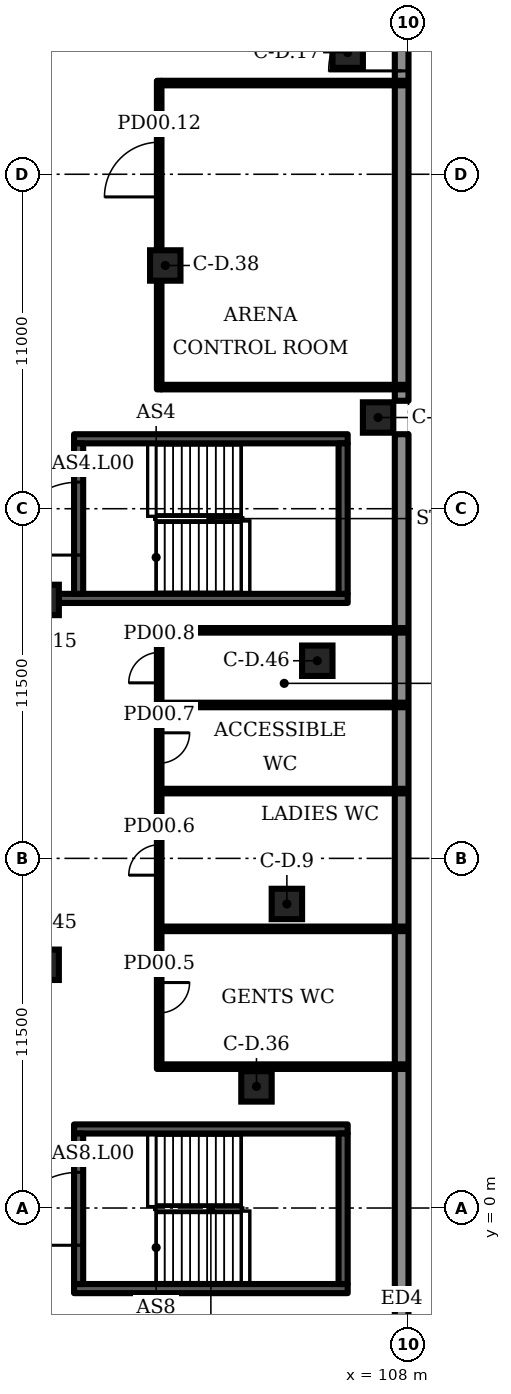
"""IFC4 building model, lengths in metres.
Left out: names, types, materials, properties, quantities, classifications, styles, units other than length and angle.
Written with IfcOpenShell. Run it as: python <this file> out.ifc"""

import sys

from ifc_helpers import new_model, si_unit, direction, frame, frame_2d, origin, origin_2d, place, context, subcontext, project, spatial, rectangle, extrude, element, fill, save


model = new_model("IFC4")
c1 = context("Model", 3, precision=1e-05, world=origin(), true_north=direction((0.0, 1.0)))
c2 = subcontext(c1, "Body", "Model", "MODEL_VIEW")
j1 = project(units=[si_unit("LENGTHUNIT", "METRE"), si_unit("PLANEANGLEUNIT", "RADIAN")], contexts=[c1])
p1 = place(None, origin())
s1 = spatial("IfcSite", under=j1, at=p1, CompositionType="ELEMENT")
p2 = place(p1, origin())
s2 = spatial("IfcBuilding", under=s1, at=p2, CompositionType="ELEMENT")
p3 = place(p2, origin())
s3 = spatial("IfcBuildingStorey", under=s2, at=p3, CompositionType="ELEMENT", Elevation=0.0)
for number, where, z_axis, x_axis in (
    (1, (107.0, 26.0, 0.0), (0.0, 0.0, 1.0), (1.0, 0.0, 0.0)),
    (2, (104.0, 10.0, 0.0), (0.0, 0.0, 1.0), (1.0, 0.0, 0.0)),
    (3, (96.0, 20.0, 0.0), (0.0, 0.0, 1.0), (1.0, 0.0, 0.0)),
    (4, (106.0, 38.0, 0.0), (0.0, 0.0, 1.0), (1.0, 0.0, 0.0)),
    (5, (103.0, 4.0, 0.0), (0.0, 0.0, 1.0), (1.0, 0.0, 0.0)),
    (6, (100.0, 31.0, 0.0), (0.0, 0.0, 1.0), (1.0, 0.0, 0.0)),
    (7, (96.0, 8.0, 0.0), (0.0, 0.0, 1.0), (1.0, 0.0, 0.0)),
    (8, (105.0, 18.0, 0.0), (0.0, 0.0, 1.0), (1.0, 0.0, 0.0)),
):
    element("IfcColumn", number, at=place(p3, frame(where, z_axis=z_axis, x_axis=x_axis)), inside=s3, PredefinedType="COLUMN", context=c2, shape_type="SweptSolid", body=[
        extrude(rectangle(XDim=1.0, YDim=1.0, at=origin_2d()), origin(), (0.0, 0.0, 1.0), 8.0),
    ])
p4 = place(p3, frame((107.775, -6.45, 0.0), z_axis=(0.0, 0.0, 1.0), x_axis=(0.0, 1.0, 0.0)))
e9 = element("IfcWall", 9, at=p4, inside=s3, PredefinedType="SOLIDWALL", context=c2, shape_type="SweptSolid", body=[
    extrude(rectangle(XDim=31.9, YDim=0.45, at=frame_2d((15.95, 0.0))), origin(), (0.0, 0.0, 1.0), 7.7),
])
p5 = place(p4, frame((0.45, 0.0, 0.0)))
e10 = element("IfcOpeningElement", 10, at=p5, cuts=e9, PredefinedType="OPENING", context=c2, shape_type="SweptSolid", body=[
    extrude(rectangle(XDim=2.4, YDim=2.4, at=frame_2d((1.2, 1.2))), frame((0.0, 0.235, 0.0), z_axis=(0.0, -1.0, 0.0), x_axis=(1.0, 0.0, 0.0)), (0.0, 0.0, 1.0), 0.47),
])
p6 = place(p3, frame((107.775, 26.55, 0.0), z_axis=(0.0, 0.0, 1.0), x_axis=(0.0, 1.0, 0.0)))
e11 = element("IfcWall", 11, at=p6, inside=s3, PredefinedType="SOLIDWALL", context=c2, shape_type="SweptSolid", body=[
    extrude(rectangle(XDim=23.35, YDim=0.45, at=frame_2d((11.675, 0.0))), origin(), (0.0, 0.0, 1.0), 7.7),
])
p7 = place(p6, frame((10.85, 0.0, 0.0)))
e12 = element("IfcOpeningElement", 12, at=p7, cuts=e11, PredefinedType="OPENING", context=c2, shape_type="SweptSolid", body=[
    extrude(rectangle(XDim=2.4, YDim=2.4, at=frame_2d((1.2, 1.2))), frame((0.0, 0.235, 0.0), z_axis=(0.0, -1.0, 0.0), x_axis=(1.0, 0.0, 0.0)), (0.0, 0.0, 1.0), 0.47),
])
for number, where, z_axis, x_axis in (
    (13, (99.875, 19.0, 0.0), (0.0, 0.0, 1.0), (1.0, 0.0, 0.0)),
    (14, (99.875, 4.65, 0.0), (0.0, 0.0, 1.0), (1.0, 0.0, 0.0)),
    (15, (99.875, 9.182, 0.0), (0.0, 0.0, 1.0), (1.0, 0.0, 0.0)),
):
    element("IfcWall", number, at=place(p3, frame(where, z_axis=z_axis, x_axis=x_axis)), inside=s3, PredefinedType="PARTITIONING", context=c2, shape_type="SweptSolid", body=[
        extrude(rectangle(XDim=8.02, YDim=0.15, at=frame_2d((4.01, 0.0))), origin(), (0.0, 0.0, 1.0), 7.7),
    ])
p8 = place(p3, frame((99.8, 4.575, 0.0), z_axis=(0.0, 0.0, 1.0), x_axis=(0.0, 1.0, 0.0)))
e16 = element("IfcWall", 16, at=p8, inside=s3, PredefinedType="PARTITIONING", context=c2, shape_type="SweptSolid", body=[
    extrude(rectangle(XDim=14.5, YDim=0.15, at=frame_2d((7.25, 0.0))), origin(), (0.0, 0.0, 1.0), 7.7),
])
p9 = place(p8, frame((1.841, 0.0, 0.0)))
e17 = element("IfcOpeningElement", 17, at=p9, cuts=e16, PredefinedType="OPENING", context=c2, shape_type="SweptSolid", body=[
    extrude(rectangle(XDim=1.0, YDim=2.1, at=frame_2d((0.5, 1.05))), frame((0.0, 0.085, 0.0), z_axis=(0.0, -1.0, 0.0), x_axis=(1.0, 0.0, 0.0)), (0.0, 0.0, 1.0), 0.17),
])
p10 = place(p8, frame((6.372, 0.0, 0.0)))
e18 = element("IfcOpeningElement", 18, at=p10, cuts=e16, PredefinedType="OPENING", context=c2, shape_type="SweptSolid", body=[
    extrude(rectangle(XDim=1.0, YDim=2.1, at=frame_2d((0.5, 1.05))), frame((0.0, 0.085, 0.0), z_axis=(0.0, -1.0, 0.0), x_axis=(1.0, 0.0, 0.0)), (0.0, 0.0, 1.0), 0.17),
])
p11 = place(p8, frame((10.054, 0.0, 0.0)))
e19 = element("IfcOpeningElement", 19, at=p11, cuts=e16, PredefinedType="OPENING", context=c2, shape_type="SweptSolid", body=[
    extrude(rectangle(XDim=1.0, YDim=2.1, at=frame_2d((0.5, 1.05))), frame((0.0, 0.085, 0.0), z_axis=(0.0, -1.0, 0.0), x_axis=(1.0, 0.0, 0.0)), (0.0, 0.0, 1.0), 0.17),
])
p12 = place(p8, frame((12.698, 0.0, 0.0)))
e20 = element("IfcOpeningElement", 20, at=p12, cuts=e16, PredefinedType="OPENING", context=c2, shape_type="SweptSolid", body=[
    extrude(rectangle(XDim=1.0, YDim=2.1, at=frame_2d((0.5, 1.05))), frame((0.0, 0.085, 0.0), z_axis=(0.0, -1.0, 0.0), x_axis=(1.0, 0.0, 0.0)), (0.0, 0.0, 1.0), 0.17),
])
p13 = place(p3, frame((99.8, 26.925, 0.0), z_axis=(0.0, 0.0, 1.0), x_axis=(0.0, 1.0, 0.0)))
e21 = element("IfcWall", 21, at=p13, inside=s3, PredefinedType="PARTITIONING", context=c2, shape_type="SweptSolid", body=[
    extrude(rectangle(XDim=3.565, YDim=0.15, at=frame_2d((1.782, 0.0))), origin(), (0.0, 0.0, 1.0), 7.7),
])
p14 = place(p3, frame((99.8, 31.51, 0.0), z_axis=(0.0, 0.0, 1.0), x_axis=(0.0, 1.0, 0.0)))
e22 = element("IfcWall", 22, at=p14, inside=s3, PredefinedType="PARTITIONING", context=c2, shape_type="SweptSolid", body=[
    extrude(rectangle(XDim=5.565, YDim=0.15, at=frame_2d((2.782, 0.0))), origin(), (0.0, 0.0, 1.0), 7.7),
])
p15 = place(p14, frame((1.745, 0.0, 0.0)))
e23 = element("IfcOpeningElement", 23, at=p15, cuts=e22, PredefinedType="OPENING", context=c2, shape_type="SweptSolid", body=[
    extrude(rectangle(XDim=1.8, YDim=2.1, at=frame_2d((0.9, 1.05))), frame((0.0, 0.085, 0.0), z_axis=(0.0, -1.0, 0.0), x_axis=(1.0, 0.0, 0.0)), (0.0, 0.0, 1.0), 0.17),
])
for number, where, z_axis, x_axis in (
    (24, (99.875, 13.713, 0.0), (0.0, 0.0, 1.0), (1.0, 0.0, 0.0)),
    (25, (99.875, 16.545, 0.0), (0.0, 0.0, 1.0), (1.0, 0.0, 0.0)),
    (26, (99.875, 27.0, 0.0), (0.0, 0.0, 1.0), (1.0, 0.0, 0.0)),
    (27, (99.875, 37.0, 0.0), (0.0, 0.0, 1.0), (1.0, 0.0, 0.0)),
):
    element("IfcWall", number, at=place(p3, frame(where, z_axis=z_axis, x_axis=x_axis)), inside=s3, PredefinedType="PARTITIONING", context=c2, shape_type="SweptSolid", body=[
        extrude(rectangle(XDim=8.02, YDim=0.15, at=frame_2d((4.01, 0.0))), origin(), (0.0, 0.0, 1.0), 7.7),
    ])
for number, where, z_axis, x_axis in (
    (28, (97.0, -2.65, 0.0), (0.0, 0.0, 1.0), (1.0, 0.0, 0.0)),
    (29, (97.0, 2.6, 0.0), (0.0, 0.0, 1.0), (1.0, 0.0, 0.0)),
):
    element("IfcWall", number, at=place(p3, frame(where, z_axis=z_axis, x_axis=x_axis)), inside=s3, PredefinedType="SHEAR", context=c2, shape_type="SweptSolid", body=[
        extrude(rectangle(XDim=9.0, YDim=0.3, at=frame_2d((4.5, 0.0))), origin(), (0.0, 0.0, 1.0), 7.7),
    ])
p16 = place(p3, frame((97.15, -2.5, 0.0), z_axis=(0.0, 0.0, 1.0), x_axis=(0.0, 1.0, 0.0)))
e30 = element("IfcWall", 30, at=p16, inside=s3, PredefinedType="SHEAR", context=c2, shape_type="SweptSolid", body=[
    extrude(rectangle(XDim=4.95, YDim=0.3, at=frame_2d((2.475, 0.0))), origin(), (0.0, 0.0, 1.0), 7.7),
])
p17 = place(p16, frame((1.275, 0.0, 0.0)))
e31 = element("IfcOpeningElement", 31, at=p17, cuts=e30, PredefinedType="OPENING", context=c2, shape_type="SweptSolid", body=[
    extrude(rectangle(XDim=2.4, YDim=2.1, at=frame_2d((1.2, 1.05))), frame((0.0, 0.16, 0.0), z_axis=(0.0, -1.0, 0.0), x_axis=(1.0, 0.0, 0.0)), (0.0, 0.0, 1.0), 0.32),
])
p18 = place(p3, frame((105.85, -2.5, 0.0), z_axis=(0.0, 0.0, 1.0), x_axis=(0.0, 1.0, 0.0)))
e32 = element("IfcWall", 32, at=p18, inside=s3, PredefinedType="SHEAR", context=c2, shape_type="SweptSolid", body=[
    extrude(rectangle(XDim=4.95, YDim=0.3, at=frame_2d((2.475, 0.0))), origin(), (0.0, 0.0, 1.0), 7.7),
])
p19 = place(p3, frame((96.5, 20.05, 0.0), z_axis=(0.0, 0.0, 1.0), x_axis=(1.0, 0.0, 0.0)))
e33 = element("IfcWall", 33, at=p19, inside=s3, PredefinedType="SHEAR", context=c2, shape_type="SweptSolid", body=[
    extrude(rectangle(XDim=9.5, YDim=0.3, at=frame_2d((4.75, 0.0))), origin(), (0.0, 0.0, 1.0), 7.7),
])
p20 = place(p3, frame((97.0, 25.3, 0.0), z_axis=(0.0, 0.0, 1.0), x_axis=(1.0, 0.0, 0.0)))
e34 = element("IfcWall", 34, at=p20, inside=s3, PredefinedType="SHEAR", context=c2, shape_type="SweptSolid", body=[
    extrude(rectangle(XDim=9.0, YDim=0.3, at=frame_2d((4.5, 0.0))), origin(), (0.0, 0.0, 1.0), 7.7),
])
p21 = place(p3, frame((97.15, 20.2, 0.0), z_axis=(0.0, 0.0, 1.0), x_axis=(0.0, 1.0, 0.0)))
e35 = element("IfcWall", 35, at=p21, inside=s3, PredefinedType="SHEAR", context=c2, shape_type="SweptSolid", body=[
    extrude(rectangle(XDim=4.95, YDim=0.3, at=frame_2d((2.475, 0.0))), origin(), (0.0, 0.0, 1.0), 7.7),
])
p22 = place(p21, frame((1.275, 0.0, 0.0)))
e36 = element("IfcOpeningElement", 36, at=p22, cuts=e35, PredefinedType="OPENING", context=c2, shape_type="SweptSolid", body=[
    extrude(rectangle(XDim=2.4, YDim=2.1, at=frame_2d((1.2, 1.05))), frame((0.0, 0.16, 0.0), z_axis=(0.0, -1.0, 0.0), x_axis=(1.0, 0.0, 0.0)), (0.0, 0.0, 1.0), 0.32),
])
p23 = place(p3, frame((105.85, 20.2, 0.0), z_axis=(0.0, 0.0, 1.0), x_axis=(0.0, 1.0, 0.0)))
e37 = element("IfcWall", 37, at=p23, inside=s3, PredefinedType="SHEAR", context=c2, shape_type="SweptSolid", body=[
    extrude(rectangle(XDim=4.95, YDim=0.3, at=frame_2d((2.475, 0.0))), origin(), (0.0, 0.0, 1.0), 7.7),
])
p24 = place(p7, origin())
e38 = element("IfcDoor", 38, at=p24, inside=s3, OperationType="DOUBLE_DOOR_DOUBLE_SWING", PredefinedType="DOOR", context=c2, shape_type="SweptSolid", body=[
    extrude(rectangle(XDim=2.4, YDim=2.4, at=frame_2d((1.2, 1.2))), frame((0.0, 0.025, 0.0), z_axis=(0.0, -1.0, 0.0), x_axis=(1.0, 0.0, 0.0)), (0.0, 0.0, 1.0), 0.05),
])
fill(e12, e38)
p25 = place(p9, origin())
e39 = element("IfcDoor", 39, at=p25, inside=s3, OperationType="SINGLE_SWING_RIGHT", PredefinedType="DOOR", context=c2, shape_type="SweptSolid", body=[
    extrude(rectangle(XDim=1.0, YDim=2.1, at=frame_2d((0.5, 1.05))), frame((0.0, 0.025, 0.0), z_axis=(0.0, -1.0, 0.0), x_axis=(1.0, 0.0, 0.0)), (0.0, 0.0, 1.0), 0.05),
])
fill(e17, e39)
p26 = place(p10, origin())
e40 = element("IfcDoor", 40, at=p26, inside=s3, OperationType="SINGLE_SWING_LEFT", PredefinedType="DOOR", context=c2, shape_type="SweptSolid", body=[
    extrude(rectangle(XDim=1.0, YDim=2.1, at=frame_2d((0.5, 1.05))), frame((0.0, 0.025, 0.0), z_axis=(0.0, -1.0, 0.0), x_axis=(1.0, 0.0, 0.0)), (0.0, 0.0, 1.0), 0.05),
])
fill(e18, e40)
p27 = place(p11, origin())
e41 = element("IfcDoor", 41, at=p27, inside=s3, OperationType="SINGLE_SWING_RIGHT", PredefinedType="DOOR", context=c2, shape_type="SweptSolid", body=[
    extrude(rectangle(XDim=1.0, YDim=2.1, at=frame_2d((0.5, 1.05))), frame((0.0, 0.025, 0.0), z_axis=(0.0, -1.0, 0.0), x_axis=(1.0, 0.0, 0.0)), (0.0, 0.0, 1.0), 0.05),
])
fill(e19, e41)
p28 = place(p12, origin())
e42 = element("IfcDoor", 42, at=p28, inside=s3, OperationType="SINGLE_SWING_LEFT", PredefinedType="DOOR", context=c2, shape_type="SweptSolid", body=[
    extrude(rectangle(XDim=1.0, YDim=2.1, at=frame_2d((0.5, 1.05))), frame((0.0, 0.025, 0.0), z_axis=(0.0, -1.0, 0.0), x_axis=(1.0, 0.0, 0.0)), (0.0, 0.0, 1.0), 0.05),
])
fill(e20, e42)
p29 = place(p15, origin())
e43 = element("IfcDoor", 43, at=p29, inside=s3, OperationType="DOUBLE_DOOR_SINGLE_SWING", PredefinedType="DOOR", context=c2, shape_type="SweptSolid", body=[
    extrude(rectangle(XDim=1.8, YDim=2.1, at=frame_2d((0.9, 1.05))), frame((0.0, 0.025, 0.0), z_axis=(0.0, -1.0, 0.0), x_axis=(1.0, 0.0, 0.0)), (0.0, 0.0, 1.0), 0.05),
])
fill(e23, e43)
p30 = place(p17, origin())
e44 = element("IfcDoor", 44, at=p30, inside=s3, OperationType="DOUBLE_DOOR_SINGLE_SWING", PredefinedType="DOOR", context=c2, shape_type="SweptSolid", body=[
    extrude(rectangle(XDim=2.4, YDim=2.1, at=frame_2d((1.2, 1.05))), frame((0.0, 0.025, 0.0), z_axis=(0.0, -1.0, 0.0), x_axis=(1.0, 0.0, 0.0)), (0.0, 0.0, 1.0), 0.05),
])
fill(e31, e44)
p31 = place(p22, origin())
e45 = element("IfcDoor", 45, at=p31, inside=s3, OperationType="DOUBLE_DOOR_SINGLE_SWING", PredefinedType="DOOR", context=c2, shape_type="SweptSolid", body=[
    extrude(rectangle(XDim=2.4, YDim=2.1, at=frame_2d((1.2, 1.05))), frame((0.0, 0.025, 0.0), z_axis=(0.0, -1.0, 0.0), x_axis=(1.0, 0.0, 0.0)), (0.0, 0.0, 1.0), 0.05),
])
fill(e36, e45)
save(model, sys.argv[1])
